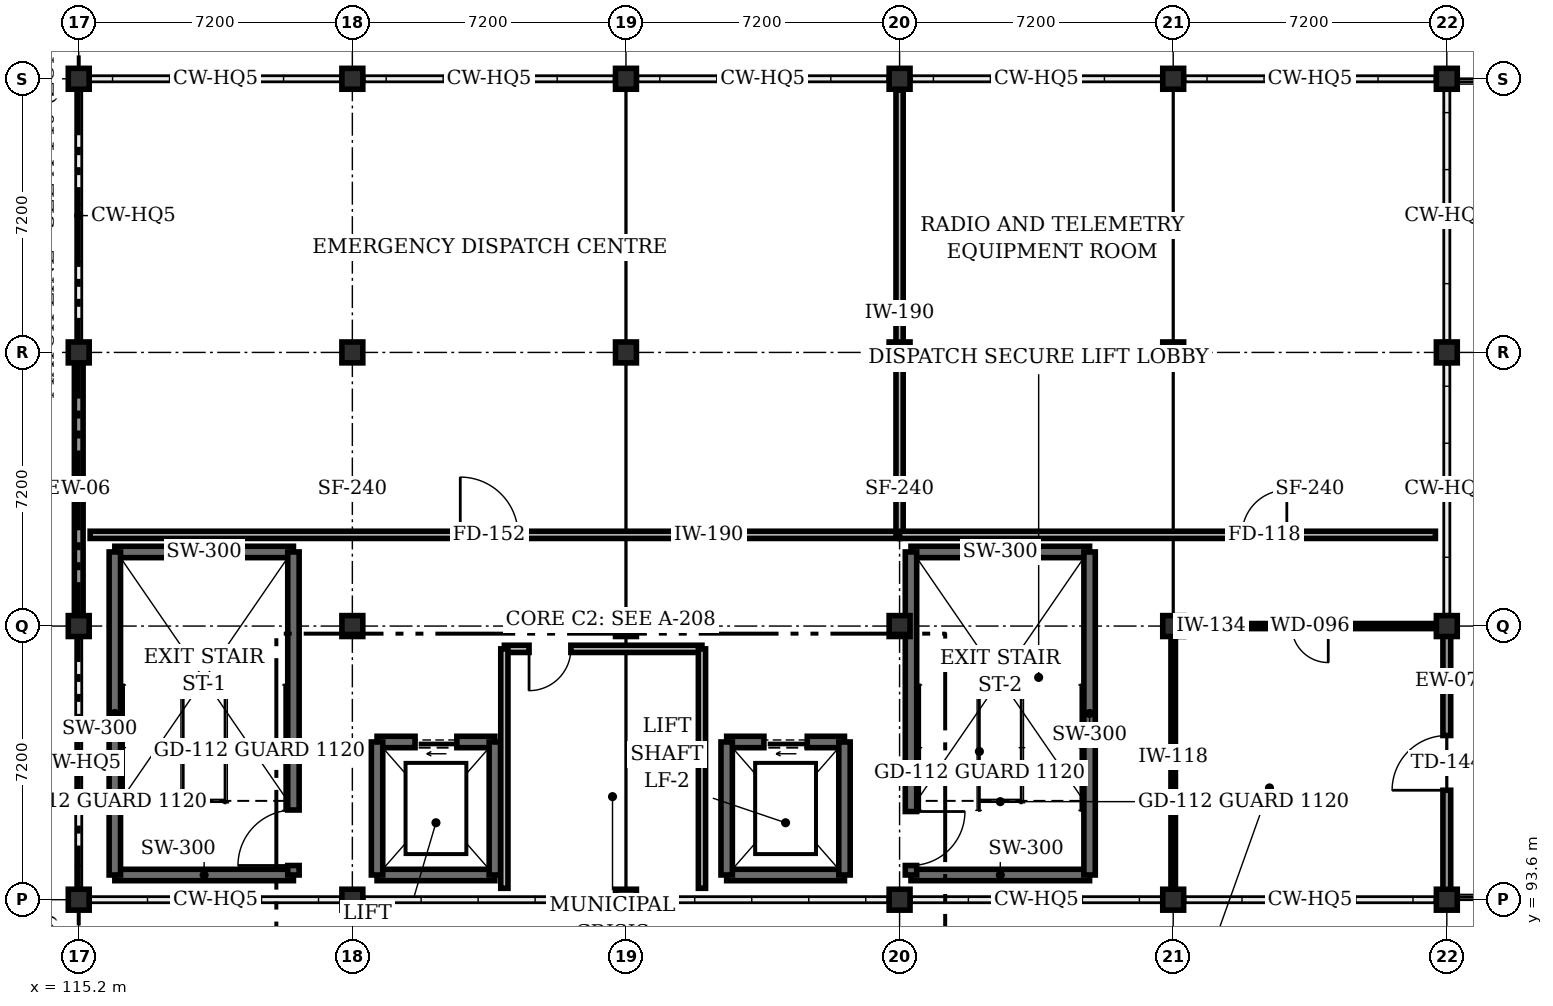
"""IFC4 building model, lengths in metres.
Left out: names, types, materials, properties, quantities, classifications, styles, units other than length and angle.
Written with IfcOpenShell. Run it as: python <this file> out.ifc"""

import sys

from ifc_helpers import new_model, si_unit, direction, frame, frame_2d, origin, origin_2d, place, context, subcontext, project, spatial, rectangle, extrude, element, fill, save


model = new_model("IFC4")
c1 = context("Model", 3, precision=1e-05, world=origin(), true_north=direction((0.0, 1.0)))
c2 = subcontext(c1, "Body", "Model", "MODEL_VIEW")
j1 = project(units=[si_unit("LENGTHUNIT", "METRE"), si_unit("PLANEANGLEUNIT", "RADIAN")], contexts=[c1])
p1 = place(None, origin())
s1 = spatial("IfcSite", under=j1, at=p1, CompositionType="ELEMENT")
p2 = place(p1, origin())
s2 = spatial("IfcBuilding", under=s1, at=p2, CompositionType="ELEMENT")
p3 = place(p2, frame((0.0, 0.0, 18.0)))
s3 = spatial("IfcBuildingStorey", under=s2, at=p3, CompositionType="ELEMENT", Elevation=18.0)
for number, where, z_axis, x_axis in (
    (1, (115.2, 93.6, 0.0), (0.0, 0.0, 1.0), (1.0, 0.0, 0.0)),
    (2, (115.2, 100.8, 0.0), (0.0, 0.0, 1.0), (1.0, 0.0, 0.0)),
    (3, (115.2, 108.0, 0.0), (0.0, 0.0, 1.0), (1.0, 0.0, 0.0)),
    (4, (115.2, 115.2, 0.0), (0.0, 0.0, 1.0), (1.0, 0.0, 0.0)),
    (5, (122.4, 93.6, 0.0), (0.0, 0.0, 1.0), (1.0, 0.0, 0.0)),
    (6, (122.4, 100.8, 0.0), (0.0, 0.0, 1.0), (1.0, 0.0, 0.0)),
    (7, (122.4, 108.0, 0.0), (0.0, 0.0, 1.0), (1.0, 0.0, 0.0)),
    (8, (122.4, 115.2, 0.0), (0.0, 0.0, 1.0), (1.0, 0.0, 0.0)),
    (9, (129.6, 93.6, 0.0), (0.0, 0.0, 1.0), (1.0, 0.0, 0.0)),
    (10, (129.6, 100.8, 0.0), (0.0, 0.0, 1.0), (1.0, 0.0, 0.0)),
    (11, (129.6, 108.0, 0.0), (0.0, 0.0, 1.0), (1.0, 0.0, 0.0)),
    (12, (129.6, 115.2, 0.0), (0.0, 0.0, 1.0), (1.0, 0.0, 0.0)),
    (13, (136.8, 93.6, 0.0), (0.0, 0.0, 1.0), (1.0, 0.0, 0.0)),
    (14, (136.8, 100.8, 0.0), (0.0, 0.0, 1.0), (1.0, 0.0, 0.0)),
    (15, (136.8, 108.0, 0.0), (0.0, 0.0, 1.0), (1.0, 0.0, 0.0)),
    (16, (136.8, 115.2, 0.0), (0.0, 0.0, 1.0), (1.0, 0.0, 0.0)),
    (17, (144.0, 93.6, 0.0), (0.0, 0.0, 1.0), (1.0, 0.0, 0.0)),
    (18, (144.0, 100.8, 0.0), (0.0, 0.0, 1.0), (1.0, 0.0, 0.0)),
    (19, (144.0, 108.0, 0.0), (0.0, 0.0, 1.0), (1.0, 0.0, 0.0)),
    (20, (144.0, 115.2, 0.0), (0.0, 0.0, 1.0), (1.0, 0.0, 0.0)),
    (21, (151.2, 93.6, 0.0), (0.0, 0.0, 1.0), (1.0, 0.0, 0.0)),
    (22, (151.2, 100.8, 0.0), (0.0, 0.0, 1.0), (1.0, 0.0, 0.0)),
    (23, (151.2, 108.0, 0.0), (0.0, 0.0, 1.0), (1.0, 0.0, 0.0)),
    (24, (151.2, 115.2, 0.0), (0.0, 0.0, 1.0), (1.0, 0.0, 0.0)),
):
    element("IfcColumn", number, at=place(p3, frame(where, z_axis=z_axis, x_axis=x_axis)), inside=s3, PredefinedType="COLUMN", context=c2, shape_type="SweptSolid", body=[
        extrude(rectangle(XDim=0.55, YDim=0.55, at=origin_2d()), origin(), (0.0, 0.0, 1.0), 4.2),
    ])
p4 = place(p3, frame((115.2, 108.0, 0.0), z_axis=(0.0, 0.0, 1.0), x_axis=(0.0, -1.0, 0.0)))
e25 = element("IfcWall", 25, at=p4, inside=s3, PredefinedType="STANDARD", context=c2, shape_type="SweptSolid", body=[
    extrude(rectangle(XDim=7.2, YDim=0.23, at=frame_2d((3.6, 0.0))), origin(), (0.0, 0.0, 1.0), 3.4),
])
p5 = place(p3, frame((151.2, 93.6, 0.0), z_axis=(0.0, 0.0, 1.0), x_axis=(0.0, 1.0, 0.0)))
e26 = element("IfcWall", 26, at=p5, inside=s3, PredefinedType="STANDARD", context=c2, shape_type="SweptSolid", body=[
    extrude(rectangle(XDim=7.2, YDim=0.205, at=frame_2d((3.6, 0.0))), origin(), (0.0, 0.0, 1.0), 3.4),
])
p6 = place(p5, frame((2.88, 0.0, 0.0)))
e27 = element("IfcOpeningElement", 27, at=p6, cuts=e26, PredefinedType="OPENING", context=c2, shape_type="SweptSolid", body=[
    extrude(rectangle(XDim=1.44, YDim=2.24, at=frame_2d((0.72, 1.12))), frame((0.0, 0.113, 0.0), z_axis=(0.0, -1.0, 0.0), x_axis=(1.0, 0.0, 0.0)), (0.0, 0.0, 1.0), 0.225),
])
for number, where, z_axis, x_axis in (
    (28, (116.15, 94.25, 0.0), (0.0, 0.0, 1.0), (1.0, 0.0, 0.0)),
    (29, (120.85, 102.75, 0.0), (0.0, 0.0, 1.0), (-1.0, 0.0, 0.0)),
):
    element("IfcWall", number, at=place(p3, frame(where, z_axis=z_axis, x_axis=x_axis)), inside=s3, PredefinedType="SHEAR", context=c2, shape_type="SweptSolid", body=[
        extrude(rectangle(XDim=4.7, YDim=0.3, at=frame_2d((2.35, 0.0))), origin(), (0.0, 0.0, 1.0), 3.975),
    ])
p7 = place(p3, frame((116.15, 102.75, 0.0), z_axis=(0.0, 0.0, 1.0), x_axis=(0.0, -1.0, 0.0)))
e30 = element("IfcWall", 30, at=p7, inside=s3, PredefinedType="SHEAR", context=c2, shape_type="SweptSolid", body=[
    extrude(rectangle(XDim=8.5, YDim=0.3, at=frame_2d((4.25, 0.0))), origin(), (0.0, 0.0, 1.0), 3.975),
])
p8 = place(p3, frame((120.85, 94.25, 0.0), z_axis=(0.0, 0.0, 1.0), x_axis=(0.0, 1.0, 0.0)))
e31 = element("IfcWall", 31, at=p8, inside=s3, PredefinedType="SHEAR", context=c2, shape_type="SweptSolid", body=[
    extrude(rectangle(XDim=8.5, YDim=0.3, at=frame_2d((4.25, 0.0))), origin(), (0.0, 0.0, 1.0), 3.975),
])
p9 = place(p8, frame((0.25, 0.0, 0.0)))
e32 = element("IfcOpeningElement", 32, at=p9, cuts=e31, PredefinedType="OPENING", context=c2, shape_type="SweptSolid", body=[
    extrude(rectangle(XDim=1.46, YDim=2.24, at=frame_2d((0.73, 1.12))), frame((0.0, 0.16, 0.0), z_axis=(0.0, -1.0, 0.0), x_axis=(1.0, 0.0, 0.0)), (0.0, 0.0, 1.0), 0.32),
])
p10 = place(p3, frame((123.05, 94.25, 0.0), z_axis=(0.0, 0.0, 1.0), x_axis=(1.0, 0.0, 0.0)))
e33 = element("IfcWall", 33, at=p10, inside=s3, PredefinedType="SHEAR", context=c2, shape_type="SweptSolid", body=[
    extrude(rectangle(XDim=3.1, YDim=0.3, at=frame_2d((1.55, 0.0))), origin(), (0.0, 0.0, 1.0), 3.975),
])
p11 = place(p3, frame((126.15, 97.75, 0.0), z_axis=(0.0, 0.0, 1.0), x_axis=(-1.0, 0.0, 0.0)))
e34 = element("IfcWall", 34, at=p11, inside=s3, PredefinedType="SHEAR", context=c2, shape_type="SweptSolid", body=[
    extrude(rectangle(XDim=3.1, YDim=0.3, at=frame_2d((1.55, 0.0))), origin(), (0.0, 0.0, 1.0), 3.975),
])
p12 = place(p11, frame((1.0, 0.0, 0.0)))
e35 = element("IfcOpeningElement", 35, at=p12, cuts=e34, PredefinedType="OPENING", context=c2, shape_type="SweptSolid", body=[
    extrude(rectangle(XDim=1.1, YDim=2.22, at=frame_2d((0.55, 1.11))), frame((0.0, 0.16, 0.0), z_axis=(0.0, -1.0, 0.0), x_axis=(1.0, 0.0, 0.0)), (0.0, 0.0, 1.0), 0.32),
])
for number, where, z_axis, x_axis in (
    (36, (123.05, 97.75, 0.0), (0.0, 0.0, 1.0), (0.0, -1.0, 0.0)),
    (37, (126.15, 94.25, 0.0), (0.0, 0.0, 1.0), (0.0, 1.0, 0.0)),
):
    element("IfcWall", number, at=place(p3, frame(where, z_axis=z_axis, x_axis=x_axis)), inside=s3, PredefinedType="SHEAR", context=c2, shape_type="SweptSolid", body=[
        extrude(rectangle(XDim=3.5, YDim=0.3, at=frame_2d((1.75, 0.0))), origin(), (0.0, 0.0, 1.0), 3.975),
    ])
for number, where, z_axis, x_axis in (
    (38, (137.1, 94.25, 0.0), (0.0, 0.0, 1.0), (1.0, 0.0, 0.0)),
    (39, (141.8, 102.75, 0.0), (0.0, 0.0, 1.0), (-1.0, 0.0, 0.0)),
):
    element("IfcWall", number, at=place(p3, frame(where, z_axis=z_axis, x_axis=x_axis)), inside=s3, PredefinedType="SHEAR", context=c2, shape_type="SweptSolid", body=[
        extrude(rectangle(XDim=4.7, YDim=0.3, at=frame_2d((2.35, 0.0))), origin(), (0.0, 0.0, 1.0), 3.975),
    ])
p13 = place(p3, frame((137.1, 102.75, 0.0), z_axis=(0.0, 0.0, 1.0), x_axis=(0.0, -1.0, 0.0)))
e40 = element("IfcWall", 40, at=p13, inside=s3, PredefinedType="SHEAR", context=c2, shape_type="SweptSolid", body=[
    extrude(rectangle(XDim=8.5, YDim=0.3, at=frame_2d((4.25, 0.0))), origin(), (0.0, 0.0, 1.0), 3.975),
])
p14 = place(p13, frame((6.83, 0.0, 0.0)))
e41 = element("IfcOpeningElement", 41, at=p14, cuts=e40, PredefinedType="OPENING", context=c2, shape_type="SweptSolid", body=[
    extrude(rectangle(XDim=1.42, YDim=2.22, at=frame_2d((0.71, 1.11))), frame((0.0, 0.16, 0.0), z_axis=(0.0, -1.0, 0.0), x_axis=(1.0, 0.0, 0.0)), (0.0, 0.0, 1.0), 0.32),
])
p15 = place(p3, frame((141.8, 94.25, 0.0), z_axis=(0.0, 0.0, 1.0), x_axis=(0.0, 1.0, 0.0)))
e42 = element("IfcWall", 42, at=p15, inside=s3, PredefinedType="SHEAR", context=c2, shape_type="SweptSolid", body=[
    extrude(rectangle(XDim=8.5, YDim=0.3, at=frame_2d((4.25, 0.0))), origin(), (0.0, 0.0, 1.0), 3.975),
])
p16 = place(p3, frame((132.25, 94.25, 0.0), z_axis=(0.0, 0.0, 1.0), x_axis=(1.0, 0.0, 0.0)))
e43 = element("IfcWall", 43, at=p16, inside=s3, PredefinedType="SHEAR", context=c2, shape_type="SweptSolid", body=[
    extrude(rectangle(XDim=3.1, YDim=0.3, at=frame_2d((1.55, 0.0))), origin(), (0.0, 0.0, 1.0), 3.975),
])
p17 = place(p3, frame((135.35, 97.75, 0.0), z_axis=(0.0, 0.0, 1.0), x_axis=(-1.0, 0.0, 0.0)))
e44 = element("IfcWall", 44, at=p17, inside=s3, PredefinedType="SHEAR", context=c2, shape_type="SweptSolid", body=[
    extrude(rectangle(XDim=3.1, YDim=0.3, at=frame_2d((1.55, 0.0))), origin(), (0.0, 0.0, 1.0), 3.975),
])
p18 = place(p17, frame((0.98, 0.0, 0.0)))
e45 = element("IfcOpeningElement", 45, at=p18, cuts=e44, PredefinedType="OPENING", context=c2, shape_type="SweptSolid", body=[
    extrude(rectangle(XDim=1.14, YDim=2.24, at=frame_2d((0.57, 1.12))), frame((0.0, 0.16, 0.0), z_axis=(0.0, -1.0, 0.0), x_axis=(1.0, 0.0, 0.0)), (0.0, 0.0, 1.0), 0.32),
])
for number, where, z_axis, x_axis in (
    (46, (132.25, 97.75, 0.0), (0.0, 0.0, 1.0), (0.0, -1.0, 0.0)),
    (47, (135.35, 94.25, 0.0), (0.0, 0.0, 1.0), (0.0, 1.0, 0.0)),
):
    element("IfcWall", number, at=place(p3, frame(where, z_axis=z_axis, x_axis=x_axis)), inside=s3, PredefinedType="SHEAR", context=c2, shape_type="SweptSolid", body=[
        extrude(rectangle(XDim=3.5, YDim=0.3, at=frame_2d((1.75, 0.0))), origin(), (0.0, 0.0, 1.0), 3.975),
    ])
p19 = place(p3, frame((131.6, 100.2, 0.0), z_axis=(0.0, 0.0, 1.0), x_axis=(-1.0, 0.0, 0.0)))
e48 = element("IfcWall", 48, at=p19, inside=s3, PredefinedType="STANDARD", context=c2, shape_type="SweptSolid", body=[
    extrude(rectangle(XDim=5.2, YDim=0.19, at=frame_2d((2.6, 0.0))), origin(), (0.0, 0.0, 1.0), 3.442),
])
p20 = place(p19, frame((3.45, 0.0, 0.0)))
e49 = element("IfcOpeningElement", 49, at=p20, cuts=e48, PredefinedType="OPENING", context=c2, shape_type="SweptSolid", body=[
    extrude(rectangle(XDim=1.1, YDim=2.16, at=frame_2d((0.55, 1.08))), frame((0.0, 0.105, 0.0), z_axis=(0.0, -1.0, 0.0), x_axis=(1.0, 0.0, 0.0)), (0.0, 0.0, 1.0), 0.21),
])
for number, where, z_axis, x_axis in (
    (50, (126.4, 100.2, 0.0), (0.0, 0.0, 1.0), (0.0, -1.0, 0.0)),
    (51, (131.6, 93.9, 0.0), (0.0, 0.0, 1.0), (0.0, 1.0, 0.0)),
):
    element("IfcWall", number, at=place(p3, frame(where, z_axis=z_axis, x_axis=x_axis)), inside=s3, PredefinedType="STANDARD", context=c2, shape_type="SweptSolid", body=[
        extrude(rectangle(XDim=6.3, YDim=0.19, at=frame_2d((3.15, 0.0))), origin(), (0.0, 0.0, 1.0), 3.975),
    ])
p21 = place(p3, frame((115.5, 103.2, 0.0), z_axis=(0.0, 0.0, 1.0), x_axis=(1.0, 0.0, 0.0)))
e52 = element("IfcWall", 52, at=p21, inside=s3, PredefinedType="STANDARD", context=c2, shape_type="SweptSolid", body=[
    extrude(rectangle(XDim=21.3, YDim=0.19, at=frame_2d((10.65, 0.0))), origin(), (0.0, 0.0, 1.0), 3.442),
])
p22 = place(p21, frame((9.74, 0.0, 0.0)))
e53 = element("IfcOpeningElement", 53, at=p22, cuts=e52, PredefinedType="OPENING", context=c2, shape_type="SweptSolid", body=[
    extrude(rectangle(XDim=1.52, YDim=2.26, at=frame_2d((0.76, 1.13))), frame((0.0, 0.105, 0.0), z_axis=(0.0, -1.0, 0.0), x_axis=(1.0, 0.0, 0.0)), (0.0, 0.0, 1.0), 0.21),
])
p23 = place(p3, frame((136.8, 103.2, 0.0), z_axis=(0.0, 0.0, 1.0), x_axis=(0.0, 1.0, 0.0)))
e54 = element("IfcWall", 54, at=p23, inside=s3, PredefinedType="STANDARD", context=c2, shape_type="SweptSolid", body=[
    extrude(rectangle(XDim=11.7, YDim=0.19, at=frame_2d((5.85, 0.0))), origin(), (0.0, 0.0, 1.0), 3.442),
])
p24 = place(p3, frame((136.8, 103.2, 0.0), z_axis=(0.0, 0.0, 1.0), x_axis=(1.0, 0.0, 0.0)))
e55 = element("IfcWall", 55, at=p24, inside=s3, PredefinedType="STANDARD", context=c2, shape_type="SweptSolid", body=[
    extrude(rectangle(XDim=14.1, YDim=0.19, at=frame_2d((7.05, 0.0))), origin(), (0.0, 0.0, 1.0), 3.442),
])
p25 = place(p24, frame((9.01, 0.0, 0.0)))
e56 = element("IfcOpeningElement", 56, at=p25, cuts=e55, PredefinedType="OPENING", context=c2, shape_type="SweptSolid", body=[
    extrude(rectangle(XDim=1.18, YDim=2.18, at=frame_2d((0.59, 1.09))), frame((0.0, 0.105, 0.0), z_axis=(0.0, -1.0, 0.0), x_axis=(1.0, 0.0, 0.0)), (0.0, 0.0, 1.0), 0.21),
])
p26 = place(p3, frame((150.9, 100.8, 0.0), z_axis=(0.0, 0.0, 1.0), x_axis=(-1.0, 0.0, 0.0)))
e57 = element("IfcWall", 57, at=p26, inside=s3, PredefinedType="STANDARD", context=c2, shape_type="SweptSolid", body=[
    extrude(rectangle(XDim=6.9, YDim=0.134, at=frame_2d((3.45, 0.0))), origin(), (0.0, 0.0, 1.0), 3.442),
])
p27 = place(p26, frame((2.82, 0.0, 0.0)))
e58 = element("IfcOpeningElement", 58, at=p27, cuts=e57, PredefinedType="OPENING", context=c2, shape_type="SweptSolid", body=[
    extrude(rectangle(XDim=0.96, YDim=2.1, at=frame_2d((0.48, 1.05))), frame((0.0, 0.077, 0.0), z_axis=(0.0, -1.0, 0.0), x_axis=(1.0, 0.0, 0.0)), (0.0, 0.0, 1.0), 0.154),
])
p28 = place(p3, frame((144.0, 100.8, 0.0), z_axis=(0.0, 0.0, 1.0), x_axis=(0.0, -1.0, 0.0)))
e59 = element("IfcWall", 59, at=p28, inside=s3, PredefinedType="STANDARD", context=c2, shape_type="SweptSolid", body=[
    extrude(rectangle(XDim=6.9, YDim=0.118, at=frame_2d((3.45, 0.0))), origin(), (0.0, 0.0, 1.0), 3.442),
])
p29 = place(p6, origin())
e60 = element("IfcDoor", 60, at=p29, inside=s3, OperationType="SINGLE_SWING_LEFT", PredefinedType="DOOR", context=c2, shape_type="SweptSolid", body=[
    extrude(rectangle(XDim=1.44, YDim=2.24, at=frame_2d((0.72, 1.12))), frame((0.0, 0.025, 0.0), z_axis=(0.0, -1.0, 0.0), x_axis=(1.0, 0.0, 0.0)), (0.0, 0.0, 1.0), 0.05),
])
fill(e27, e60)
p30 = place(p9, origin())
e61 = element("IfcDoor", 61, at=p30, inside=s3, OperationType="SINGLE_SWING_LEFT", PredefinedType="DOOR", context=c2, shape_type="SweptSolid", body=[
    extrude(rectangle(XDim=1.46, YDim=2.24, at=frame_2d((0.73, 1.12))), frame((0.0, 0.025, 0.0), z_axis=(0.0, -1.0, 0.0), x_axis=(1.0, 0.0, 0.0)), (0.0, 0.0, 1.0), 0.05),
])
fill(e32, e61)
p31 = place(p12, origin())
e62 = element("IfcDoor", 62, at=p31, inside=s3, OperationType="SLIDING_TO_LEFT", PredefinedType="DOOR", context=c2, shape_type="SweptSolid", body=[
    extrude(rectangle(XDim=1.1, YDim=2.22, at=frame_2d((0.55, 1.11))), frame((0.0, 0.025, 0.0), z_axis=(0.0, -1.0, 0.0), x_axis=(1.0, 0.0, 0.0)), (0.0, 0.0, 1.0), 0.05),
])
fill(e35, e62)
p32 = place(p14, origin())
e63 = element("IfcDoor", 63, at=p32, inside=s3, OperationType="SINGLE_SWING_LEFT", PredefinedType="DOOR", context=c2, shape_type="SweptSolid", body=[
    extrude(rectangle(XDim=1.42, YDim=2.22, at=frame_2d((0.71, 1.11))), frame((0.0, 0.025, 0.0), z_axis=(0.0, -1.0, 0.0), x_axis=(1.0, 0.0, 0.0)), (0.0, 0.0, 1.0), 0.05),
])
fill(e41, e63)
p33 = place(p18, origin())
e64 = element("IfcDoor", 64, at=p33, inside=s3, OperationType="SLIDING_TO_LEFT", PredefinedType="DOOR", context=c2, shape_type="SweptSolid", body=[
    extrude(rectangle(XDim=1.14, YDim=2.24, at=frame_2d((0.57, 1.12))), frame((0.0, 0.025, 0.0), z_axis=(0.0, -1.0, 0.0), x_axis=(1.0, 0.0, 0.0)), (0.0, 0.0, 1.0), 0.05),
])
fill(e45, e64)
p34 = place(p20, origin())
e65 = element("IfcDoor", 65, at=p34, inside=s3, OperationType="SINGLE_SWING_RIGHT", PredefinedType="DOOR", context=c2, shape_type="SweptSolid", body=[
    extrude(rectangle(XDim=1.1, YDim=2.16, at=frame_2d((0.55, 1.08))), frame((0.0, 0.025, 0.0), z_axis=(0.0, -1.0, 0.0), x_axis=(1.0, 0.0, 0.0)), (0.0, 0.0, 1.0), 0.05),
])
fill(e49, e65)
p35 = place(p22, origin())
e66 = element("IfcDoor", 66, at=p35, inside=s3, OperationType="SINGLE_SWING_LEFT", PredefinedType="DOOR", context=c2, shape_type="SweptSolid", body=[
    extrude(rectangle(XDim=1.52, YDim=2.26, at=frame_2d((0.76, 1.13))), frame((0.0, 0.025, 0.0), z_axis=(0.0, -1.0, 0.0), x_axis=(1.0, 0.0, 0.0)), (0.0, 0.0, 1.0), 0.05),
])
fill(e53, e66)
p36 = place(p25, origin())
e67 = element("IfcDoor", 67, at=p36, inside=s3, OperationType="SINGLE_SWING_RIGHT", PredefinedType="DOOR", context=c2, shape_type="SweptSolid", body=[
    extrude(rectangle(XDim=1.18, YDim=2.18, at=frame_2d((0.59, 1.09))), frame((0.0, 0.025, 0.0), z_axis=(0.0, -1.0, 0.0), x_axis=(1.0, 0.0, 0.0)), (0.0, 0.0, 1.0), 0.05),
])
fill(e56, e67)
p37 = place(p27, origin())
e68 = element("IfcDoor", 68, at=p37, inside=s3, OperationType="SINGLE_SWING_LEFT", PredefinedType="DOOR", context=c2, shape_type="SweptSolid", body=[
    extrude(rectangle(XDim=0.96, YDim=2.1, at=frame_2d((0.48, 1.05))), frame((0.0, 0.025, 0.0), z_axis=(0.0, -1.0, 0.0), x_axis=(1.0, 0.0, 0.0)), (0.0, 0.0, 1.0), 0.05),
])
fill(e58, e68)
save(model, sys.argv[1])
